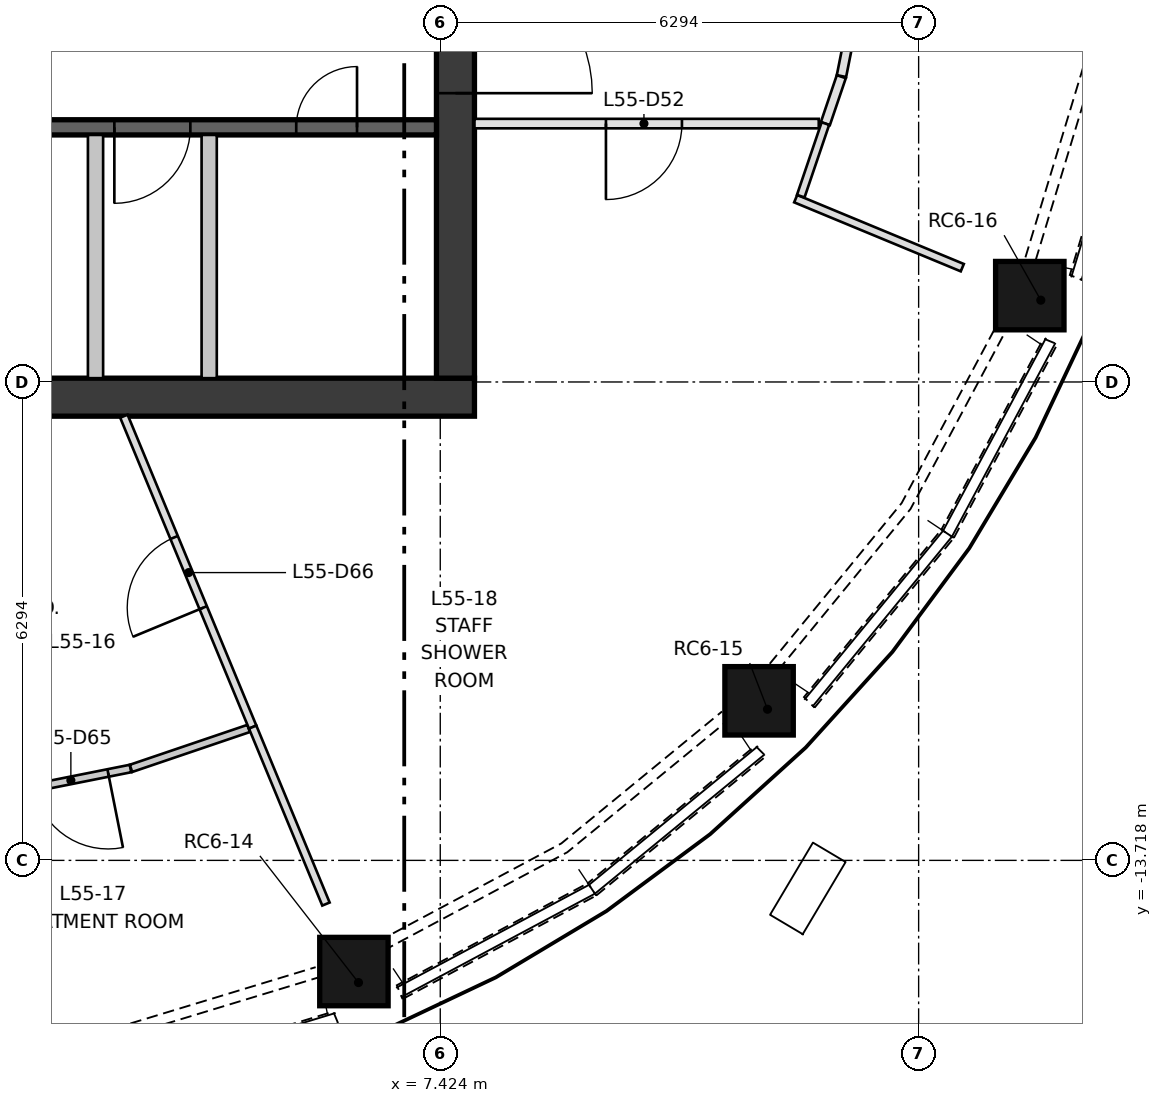
"""IFC4 building model, lengths in metres.
Left out: names, types, materials, properties, quantities, classifications, styles, units other than length and angle.
Written with IfcOpenShell. Run it as: python <this file> out.ifc"""

import sys

from ifc_helpers import new_model, si_unit, direction, frame, frame_2d, origin, origin_2d, place, context, subcontext, project, spatial, polyline, rectangle, outline, extrude, element, fill, save


model = new_model("IFC4")
c1 = context("Model", 3, precision=1e-05, world=origin(), true_north=direction((0.0, 1.0)))
c2 = subcontext(c1, "Body", "Model", "MODEL_VIEW")
j1 = project(units=[si_unit("LENGTHUNIT", "METRE"), si_unit("PLANEANGLEUNIT", "RADIAN")], contexts=[c1])
p1 = place(None, origin())
s1 = spatial("IfcSite", under=j1, at=p1, CompositionType="ELEMENT")
p2 = place(p1, origin())
s2 = spatial("IfcBuilding", under=s1, at=p2, CompositionType="ELEMENT")
p3 = place(p2, frame((0.0, 0.0, 204.4)))
s3 = spatial("IfcBuildingStorey", under=s2, at=p3, CompositionType="ELEMENT", Elevation=204.4)
p4 = place(p3, frame((6.348, -15.325, 0.5), z_axis=(0.0, 0.0, 1.0), x_axis=(-0.923994215472, -0.38240644578, 0.0)))
e1 = element("IfcColumn", 1, at=p4, inside=s3, PredefinedType="COLUMN", context=c2, shape_type="SweptSolid", body=[
    extrude(rectangle(XDim=0.9, YDim=0.9, at=origin_2d()), origin(), (0.0, -0.218, 0.976), 2.408),
])
p5 = place(p3, frame((11.729, -11.729, 0.5), z_axis=(0.0, 0.0, 1.0), x_axis=(-0.707106781187, -0.707106781187, 0.0)))
e2 = element("IfcColumn", 2, at=p5, inside=s3, PredefinedType="COLUMN", context=c2, shape_type="SweptSolid", body=[
    extrude(rectangle(XDim=0.9, YDim=0.9, at=origin_2d()), origin(), (0.0, -0.218, 0.976), 2.408),
])
p6 = place(p3, frame((15.325, -6.348, 0.5), z_axis=(0.0, 0.0, 1.0), x_axis=(-0.38240644578, -0.923994215472, 0.0)))
e3 = element("IfcColumn", 3, at=p6, inside=s3, PredefinedType="COLUMN", context=c2, shape_type="SweptSolid", body=[
    extrude(rectangle(XDim=0.9, YDim=0.9, at=origin_2d()), origin(), (0.0, -0.218, 0.976), 2.408),
])
p7 = place(p3, frame((-7.874, -7.624, 0.0), z_axis=(0.0, 0.0, 1.0), x_axis=(1.0, 0.0, 0.0)))
e4 = element("IfcWall", 4, at=p7, inside=s3, PredefinedType="SHEAR", context=c2, shape_type="SweptSolid", body=[
    extrude(rectangle(XDim=15.748, YDim=0.5, at=frame_2d((7.874, 0.0))), origin(), (0.0, 0.0, 1.0), 3.35),
])
p8 = place(p3, frame((7.624, -7.374, 0.0), z_axis=(0.0, 0.0, 1.0), x_axis=(0.0, 1.0, 0.0)))
e5 = element("IfcWall", 5, at=p8, inside=s3, PredefinedType="SHEAR", context=c2, shape_type="SweptSolid", body=[
    extrude(rectangle(XDim=14.748, YDim=0.5, at=frame_2d((7.374, 0.0))), origin(), (0.0, 0.0, 1.0), 3.35),
])
p9 = place(p8, frame((6.874, 0.0, 0.0)))
e6 = element("IfcOpeningElement", 6, at=p9, cuts=e5, PredefinedType="OPENING", context=c2, shape_type="SweptSolid", body=[
    extrude(rectangle(XDim=1.0, YDim=2.1, at=frame_2d((0.5, 1.05))), frame((0.0, 0.26, 0.0), z_axis=(0.0, -1.0, 0.0), x_axis=(1.0, 0.0, 0.0)), (0.0, 0.0, 1.0), 0.52),
])
p10 = place(p8, frame((3.75, 0.0, 0.0)))
e7 = element("IfcOpeningElement", 7, at=p10, cuts=e5, PredefinedType="OPENING", context=c2, shape_type="SweptSolid", body=[
    extrude(rectangle(XDim=1.8, YDim=2.1, at=frame_2d((0.9, 1.05))), frame((0.0, 0.26, 0.0), z_axis=(0.0, -1.0, 0.0), x_axis=(1.0, 0.0, 0.0)), (0.0, 0.0, 1.0), 0.52),
])
p11 = place(p8, frame((9.198, 0.0, 0.0)))
e8 = element("IfcOpeningElement", 8, at=p11, cuts=e5, PredefinedType="OPENING", context=c2, shape_type="SweptSolid", body=[
    extrude(rectangle(XDim=1.8, YDim=2.1, at=frame_2d((0.9, 1.05))), frame((0.0, 0.26, 0.0), z_axis=(0.0, -1.0, 0.0), x_axis=(1.0, 0.0, 0.0)), (0.0, 0.0, 1.0), 0.52),
])
p12 = place(p3, frame((-7.374, -4.074, 0.0), z_axis=(0.0, 0.0, 1.0), x_axis=(1.0, 0.0, 0.0)))
e9 = element("IfcWall", 9, at=p12, inside=s3, PredefinedType="SHEAR", context=c2, shape_type="SweptSolid", body=[
    extrude(rectangle(XDim=14.748, YDim=0.2, at=frame_2d((7.374, 0.0))), origin(), (0.0, 0.0, 1.0), 3.0),
])
p13 = place(p12, frame((1.319, 0.0, 0.0)))
e10 = element("IfcOpeningElement", 10, at=p13, cuts=e9, PredefinedType="OPENING", context=c2, shape_type="SweptSolid", body=[
    extrude(rectangle(XDim=1.1, YDim=2.1, at=frame_2d((0.55, 1.05))), frame((0.0, 0.11, 0.0), z_axis=(0.0, -1.0, 0.0), x_axis=(1.0, 0.0, 0.0)), (0.0, 0.0, 1.0), 0.22),
])
p14 = place(p12, frame((4.456, 0.0, 0.0)))
e11 = element("IfcOpeningElement", 11, at=p14, cuts=e9, PredefinedType="OPENING", context=c2, shape_type="SweptSolid", body=[
    extrude(rectangle(XDim=1.1, YDim=2.1, at=frame_2d((0.55, 1.05))), frame((0.0, 0.11, 0.0), z_axis=(0.0, -1.0, 0.0), x_axis=(1.0, 0.0, 0.0)), (0.0, 0.0, 1.0), 0.22),
])
p15 = place(p12, frame((7.918, 0.0, 0.0)))
e12 = element("IfcOpeningElement", 12, at=p15, cuts=e9, PredefinedType="OPENING", context=c2, shape_type="SweptSolid", body=[
    extrude(rectangle(XDim=1.0, YDim=2.1, at=frame_2d((0.5, 1.05))), frame((0.0, 0.11, 0.0), z_axis=(0.0, -1.0, 0.0), x_axis=(1.0, 0.0, 0.0)), (0.0, 0.0, 1.0), 0.22),
])
p16 = place(p12, frame((10.51, 0.0, 0.0)))
e13 = element("IfcOpeningElement", 13, at=p16, cuts=e9, PredefinedType="OPENING", context=c2, shape_type="SweptSolid", body=[
    extrude(rectangle(XDim=1.0, YDim=2.1, at=frame_2d((0.5, 1.05))), frame((0.0, 0.11, 0.0), z_axis=(0.0, -1.0, 0.0), x_axis=(1.0, 0.0, 0.0)), (0.0, 0.0, 1.0), 0.22),
])
p17 = place(p12, frame((12.903, 0.0, 0.0)))
e14 = element("IfcOpeningElement", 14, at=p17, cuts=e9, PredefinedType="OPENING", context=c2, shape_type="SweptSolid", body=[
    extrude(rectangle(XDim=0.8, YDim=2.1, at=frame_2d((0.4, 1.05))), frame((0.0, 0.11, 0.0), z_axis=(0.0, -1.0, 0.0), x_axis=(1.0, 0.0, 0.0)), (0.0, 0.0, 1.0), 0.22),
])
for number, where, z_axis, x_axis in (
    (15, (2.888, -7.374, 0.0), (0.0, 0.0, 1.0), (0.0, 1.0, 0.0)),
    (16, (4.384, -7.374, 0.0), (0.0, 0.0, 1.0), (0.0, 1.0, 0.0)),
):
    element("IfcWall", number, at=place(p3, frame(where, z_axis=z_axis, x_axis=x_axis)), inside=s3, PredefinedType="PARTITIONING", context=c2, shape_type="SweptSolid", body=[
        extrude(rectangle(XDim=3.2, YDim=0.2, at=frame_2d((1.6, 0.0))), origin(), (0.0, 0.0, 1.0), 3.0),
    ])
p18 = place(p3, frame((3.327, -16.727, 0.0), z_axis=(0.28337916088, -0.935242697182, 0.212172921331), x_axis=(0.957032145656, 0.289981848011, 2.070465e-06)))
e17 = element("IfcWall", 17, at=p18, inside=s3, PredefinedType="SOLIDWALL", context=c2, shape_type="SweptSolid", body=[
    extrude(outline(polyline([(0.0, 0.0), (2.889, 0.0), (2.869, 0.921), (0.019, 0.921), (0.0, 0.0)])), origin(), (0.0, 0.0, -1.0), 0.3),
])
p19 = place(p3, frame((6.928, -15.542, 0.0), z_axis=(0.460490666642, -0.86194406833, 0.212133846912), x_axis=(0.88201888422, 0.471214057348, -6.139239e-06)))
e18 = element("IfcWall", 18, at=p19, inside=s3, PredefinedType="SOLIDWALL", context=c2, shape_type="SweptSolid", body=[
    extrude(outline(polyline([(0.0, 0.0), (2.889, 0.0), (2.869, 0.921), (0.019, 0.921), (0.0, 0.0)])), origin(), (0.0, 0.0, -1.0), 0.3),
])
p20 = place(p3, frame((9.476, -14.181, 0.0), z_axis=(0.619877353438, -0.755401474704, 0.212416286358), x_axis=(0.77304281661, 0.634353847381, 4.54494e-07)))
e19 = element("IfcWall", 19, at=p20, inside=s3, PredefinedType="SOLIDWALL", context=c2, shape_type="SweptSolid", body=[
    extrude(outline(polyline([(0.0, 0.0), (2.889, 5.551e-17), (2.869, 0.921), (0.019, 0.921), (0.0, 0.0)])), origin(), (0.0, 0.0, -1.0), 0.3),
])
p21 = place(p3, frame((12.349, -11.709, 0.0), z_axis=(0.755401474704, -0.619877353438, 0.212416286358), x_axis=(0.634353847381, 0.77304281661, -4.54494e-07)))
e20 = element("IfcWall", 20, at=p21, inside=s3, PredefinedType="SOLIDWALL", context=c2, shape_type="SweptSolid", body=[
    extrude(outline(polyline([(0.0, 0.0), (2.889, -5.551e-17), (2.869, 0.921), (0.019, 0.921), (0.0, 0.0)])), origin(), (0.0, 0.0, -1.0), 0.3),
])
p22 = place(p3, frame((14.181, -9.476, 0.0), z_axis=(0.861898085138, -0.460433644275, 0.212444228104), x_axis=(0.471189380725, 0.882032067156, 6.6202e-08)))
e21 = element("IfcWall", 21, at=p22, inside=s3, PredefinedType="SOLIDWALL", context=c2, shape_type="SweptSolid", body=[
    extrude(outline(polyline([(0.0, 0.0), (2.889, 5.551e-17), (2.869, 0.921), (0.019, 0.921), (0.0, 0.0)])), origin(), (0.0, 0.0, -1.0), 0.3),
])
p23 = place(p3, frame((15.889, -6.092, 0.0), z_axis=(0.935152492223, -0.28338395091, 0.212563761391), x_axis=(0.29001059817, 0.957023433845, 4.460531e-06)))
e22 = element("IfcWall", 22, at=p23, inside=s3, PredefinedType="SOLIDWALL", context=c2, shape_type="SweptSolid", body=[
    extrude(outline(polyline([(0.0, 0.0), (2.889, 0.0), (2.869, 0.921), (0.019, 0.921), (0.0, 0.0)])), origin(), (0.0, 0.0, -1.0), 0.3),
])
p24 = place(p3, frame((12.404, -4.024, 0.0), z_axis=(0.0, 0.0, 1.0), x_axis=(-1.0, 0.0, 0.0)))
e23 = element("IfcWall", 23, at=p24, inside=s3, PredefinedType="PARTITIONING", context=c2, shape_type="SweptSolid", body=[
    extrude(rectangle(XDim=4.53, YDim=0.125, at=frame_2d((2.265, 0.0))), origin(), (0.0, 0.0, 1.0), 3.0),
])
p25 = place(p24, frame((1.8, 0.0, 0.0)))
e24 = element("IfcOpeningElement", 24, at=p25, cuts=e23, PredefinedType="OPENING", context=c2, shape_type="SweptSolid", body=[
    extrude(rectangle(XDim=1.0, YDim=2.1, at=frame_2d((0.5, 1.05))), frame((0.0, 0.073, 0.0), z_axis=(0.0, -1.0, 0.0), x_axis=(1.0, 0.0, 0.0)), (0.0, 0.0, 1.0), 0.145),
])
p26 = place(p3, frame((12.701, -3.407, 0.0), z_axis=(0.0, 0.0, 1.0), x_axis=(-0.321506357846, -0.946907419902, 0.0)))
e25 = element("IfcWall", 25, at=p26, inside=s3, PredefinedType="PARTITIONING", context=c2, shape_type="SweptSolid", body=[
    extrude(rectangle(XDim=0.652, YDim=0.125, at=frame_2d((0.326, 0.0))), origin(), (0.0, 0.0, 1.0), 3.0),
])
p27 = place(p3, frame((13.037, -1.72, 0.0), z_axis=(0.0, 0.0, 1.0), x_axis=(-0.195101249107, -0.980783106806, 0.0)))
e26 = element("IfcWall", 26, at=p27, inside=s3, PredefinedType="PARTITIONING", context=c2, shape_type="SweptSolid", body=[
    extrude(rectangle(XDim=1.712, YDim=0.125, at=frame_2d((0.856, 0.0))), origin(), (0.0, 0.0, 1.0), 3.0),
])
p28 = place(p3, frame((3.348, -12.509, 0.0), z_axis=(0.0, 0.0, 1.0), x_axis=(-0.98076390104, -0.195197772573, 0.0)))
e27 = element("IfcWall", 27, at=p28, inside=s3, PredefinedType="PARTITIONING", context=c2, shape_type="SweptSolid", body=[
    extrude(rectangle(XDim=1.687, YDim=0.1, at=frame_2d((0.844, 0.0))), origin(), (0.0, 0.0, 1.0), 3.0),
])
p29 = place(p28, frame((0.3, 0.0, 0.0)))
e28 = element("IfcOpeningElement", 28, at=p29, cuts=e27, PredefinedType="OPENING", context=c2, shape_type="SweptSolid", body=[
    extrude(rectangle(XDim=1.0, YDim=2.1, at=frame_2d((0.5, 1.05))), frame((0.0, 0.06, 0.0), z_axis=(0.0, -1.0, 0.0), x_axis=(1.0, 0.0, 0.0)), (0.0, 0.0, 1.0), 0.12),
])
p30 = place(p3, frame((4.903, -11.982, 0.0), z_axis=(0.0, 0.0, 1.0), x_axis=(-0.94695192125, -0.321375261714, 0.0)))
e29 = element("IfcWall", 29, at=p30, inside=s3, PredefinedType="PARTITIONING", context=c2, shape_type="SweptSolid", body=[
    extrude(rectangle(XDim=1.635, YDim=0.1, at=frame_2d((0.817, 0.0))), origin(), (0.0, 0.0, 1.0), 3.0),
])
p31 = place(p3, frame((4.956, -11.964, 0.0), z_axis=(0.0, 0.0, 1.0), x_axis=(-0.38271544888, 0.923866270186, 0.0)))
e30 = element("IfcWall", 30, at=p31, inside=s3, PredefinedType="PARTITIONING", context=c2, shape_type="SweptSolid", body=[
    extrude(rectangle(XDim=4.427, YDim=0.105, at=frame_2d((2.214, 0.0))), origin(), (0.0, 0.0, 1.0), 3.0),
])
p32 = place(p31, frame((1.7, 0.0, 0.0)))
e31 = element("IfcOpeningElement", 31, at=p32, cuts=e30, PredefinedType="OPENING", context=c2, shape_type="SweptSolid", body=[
    extrude(rectangle(XDim=1.0, YDim=2.1, at=frame_2d((0.5, 1.05))), frame((0.0, 0.062, 0.0), z_axis=(0.0, -1.0, 0.0), x_axis=(1.0, 0.0, 0.0)), (0.0, 0.0, 1.0), 0.125),
])
p33 = place(p3, frame((4.956, -11.964, 0.0), z_axis=(0.0, 0.0, 1.0), x_axis=(0.382654099242, -0.923891682143, 0.0)))
e32 = element("IfcWall", 32, at=p33, inside=s3, PredefinedType="PARTITIONING", context=c2, shape_type="SweptSolid", body=[
    extrude(rectangle(XDim=2.52, YDim=0.105, at=frame_2d((1.26, 0.0))), origin(), (0.0, 0.0, 1.0), 3.0),
])
p34 = place(p3, frame((12.101, -5.012, 0.0), z_axis=(0.0, 0.0, 1.0), x_axis=(0.923872596589, -0.382700176734, 0.0)))
e33 = element("IfcWall", 33, at=p34, inside=s3, PredefinedType="PARTITIONING", context=c2, shape_type="SweptSolid", body=[
    extrude(rectangle(XDim=2.373, YDim=0.105, at=frame_2d((1.186, 0.0))), origin(), (0.0, 0.0, 1.0), 3.0),
])
p35 = place(p3, frame((12.491, -4.024, 0.0), z_axis=(0.0, 0.0, 1.0), x_axis=(-0.321525085424, -0.946901061064, 0.0)))
e34 = element("IfcWall", 34, at=p35, inside=s3, PredefinedType="PARTITIONING", context=c2, shape_type="SweptSolid", body=[
    extrude(rectangle(XDim=1.008, YDim=0.105, at=frame_2d((0.504, 0.0))), origin(), (0.0, 0.0, 1.0), 3.0),
])
p36 = place(p16, frame((1.0, 0.0, 0.0), z_axis=(0.0, 0.0, 1.0), x_axis=(-1.0, 0.0, 0.0)))
e35 = element("IfcDoor", 35, at=p36, inside=s3, OperationType="SINGLE_SWING_LEFT", PredefinedType="DOOR", context=c2, shape_type="SweptSolid", body=[
    extrude(rectangle(XDim=1.0, YDim=2.1, at=frame_2d((0.5, 1.05))), frame((0.0, 0.025, 0.0), z_axis=(0.0, -1.0, 0.0), x_axis=(1.0, 0.0, 0.0)), (0.0, 0.0, 1.0), 0.05),
])
fill(e13, e35)
p37 = place(p17, origin())
e36 = element("IfcDoor", 36, at=p37, inside=s3, OperationType="SINGLE_SWING_RIGHT", PredefinedType="DOOR", context=c2, shape_type="SweptSolid", body=[
    extrude(rectangle(XDim=0.8, YDim=2.1, at=frame_2d((0.4, 1.05))), frame((0.0, 0.025, 0.0), z_axis=(0.0, -1.0, 0.0), x_axis=(1.0, 0.0, 0.0)), (0.0, 0.0, 1.0), 0.05),
])
fill(e14, e36)
p38 = place(p10, frame((1.8, 0.0, 0.0), z_axis=(0.0, 0.0, 1.0), x_axis=(-1.0, 0.0, 0.0)))
e37 = element("IfcDoor", 37, at=p38, inside=s3, OperationType="DOUBLE_DOOR_SINGLE_SWING", PredefinedType="DOOR", context=c2, shape_type="SweptSolid", body=[
    extrude(rectangle(XDim=1.8, YDim=2.1, at=frame_2d((0.9, 1.05))), frame((0.0, 0.025, 0.0), z_axis=(0.0, -1.0, 0.0), x_axis=(1.0, 0.0, 0.0)), (0.0, 0.0, 1.0), 0.05),
])
fill(e7, e37)
p39 = place(p25, origin())
e38 = element("IfcDoor", 38, at=p39, inside=s3, OperationType="SINGLE_SWING_RIGHT", PredefinedType="DOOR", context=c2, shape_type="SweptSolid", body=[
    extrude(rectangle(XDim=1.0, YDim=2.1, at=frame_2d((0.5, 1.05))), frame((0.0, 0.025, 0.0), z_axis=(0.0, -1.0, 0.0), x_axis=(1.0, 0.0, 0.0)), (0.0, 0.0, 1.0), 0.05),
])
fill(e24, e38)
p40 = place(p29, origin())
e39 = element("IfcDoor", 39, at=p40, inside=s3, OperationType="SINGLE_SWING_LEFT", PredefinedType="DOOR", context=c2, shape_type="SweptSolid", body=[
    extrude(rectangle(XDim=1.0, YDim=2.1, at=frame_2d((0.5, 1.05))), frame((0.0, 0.025, 0.0), z_axis=(0.0, -1.0, 0.0), x_axis=(1.0, 0.0, 0.0)), (0.0, 0.0, 1.0), 0.05),
])
fill(e28, e39)
p41 = place(p32, origin())
e40 = element("IfcDoor", 40, at=p41, inside=s3, OperationType="SINGLE_SWING_LEFT", PredefinedType="DOOR", context=c2, shape_type="SweptSolid", body=[
    extrude(rectangle(XDim=1.0, YDim=2.1, at=frame_2d((0.5, 1.05))), frame((0.0, 0.025, 0.0), z_axis=(0.0, -1.0, 0.0), x_axis=(1.0, 0.0, 0.0)), (0.0, 0.0, 1.0), 0.05),
])
fill(e31, e40)
save(model, sys.argv[1])
